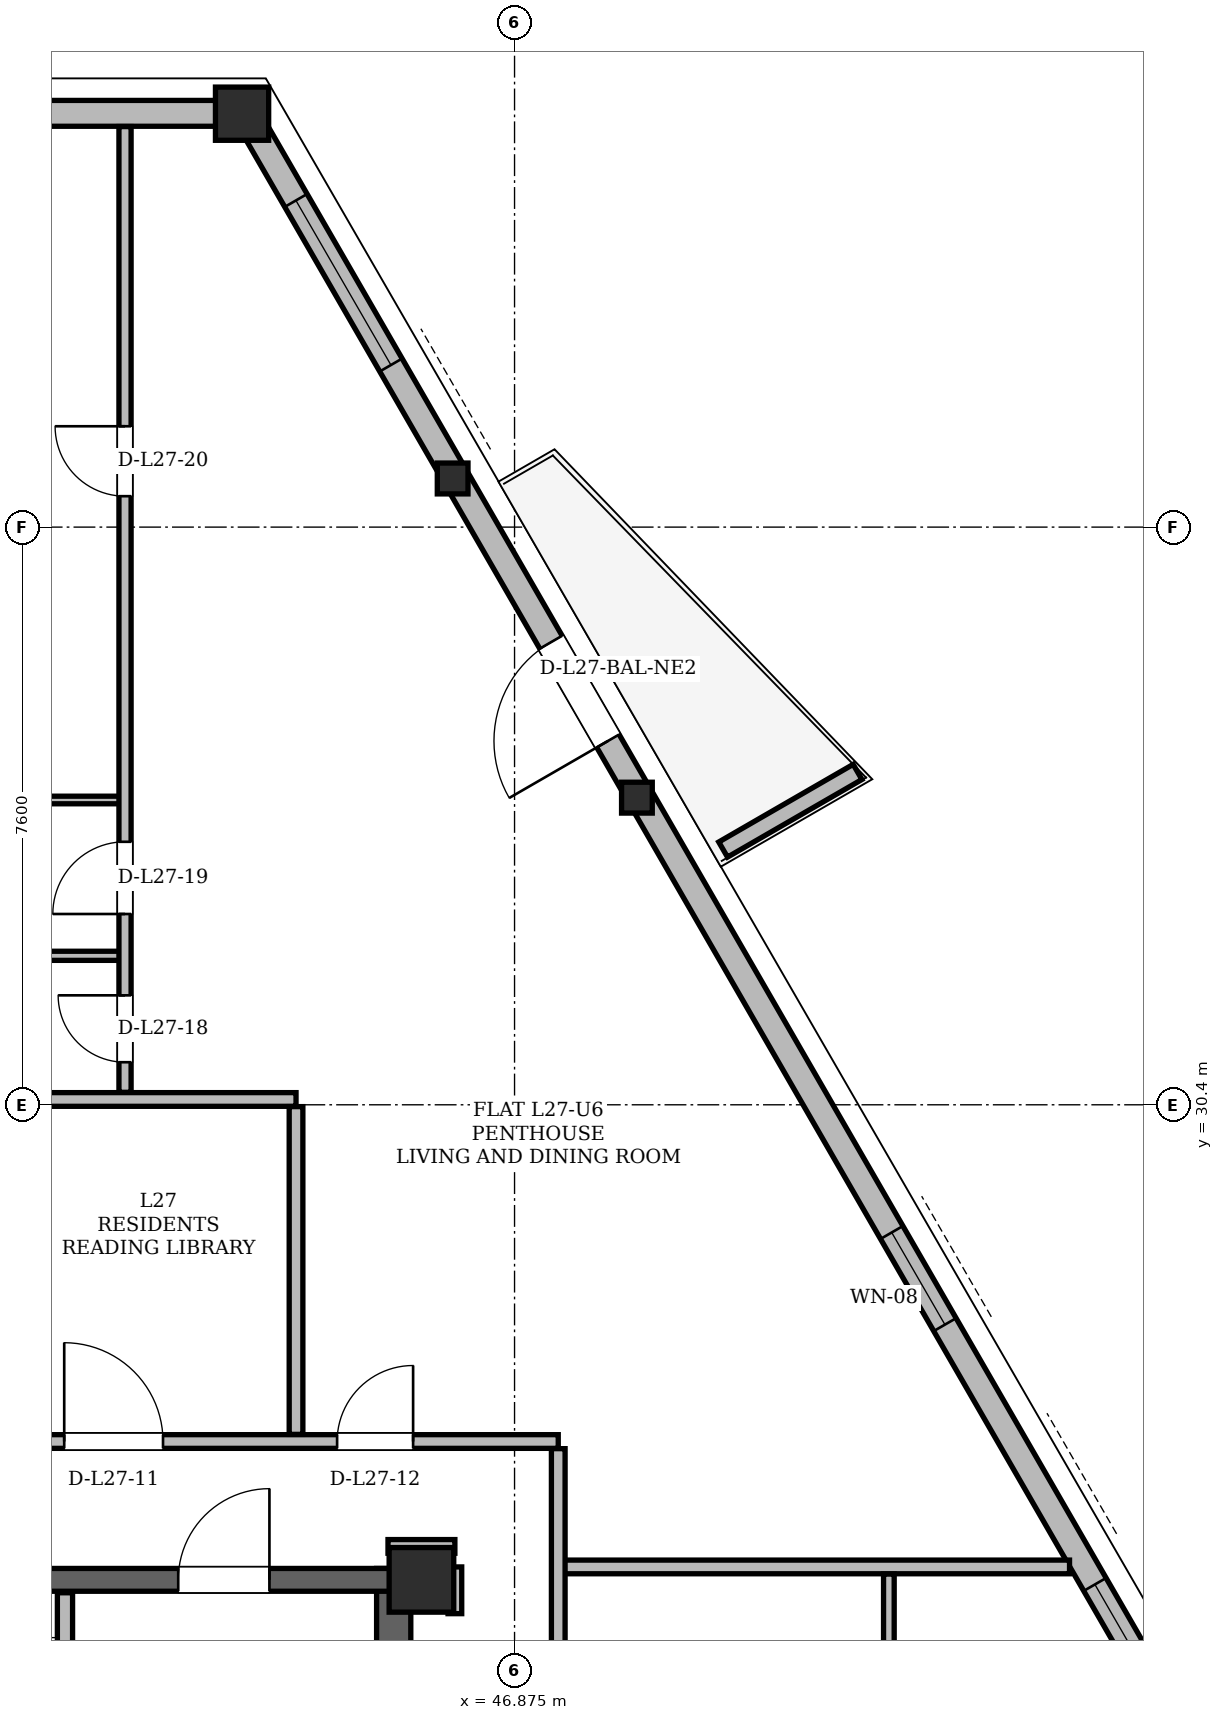
"""IFC4 building model, lengths in metres.
Left out: names, types, materials, properties, quantities, classifications, styles, units other than length and angle.
Written with IfcOpenShell. Run it as: python <this file> out.ifc"""

import sys

from ifc_helpers import new_model, si_unit, direction, frame, frame_2d, origin, origin_2d, place, context, subcontext, project, spatial, polyline, rectangle, hollow_rectangle, i_section, outline, extrude, element, fill, save


model = new_model("IFC4")
c1 = context("Model", 3, precision=1e-05, world=origin(), true_north=direction((0.0, 1.0)))
c2 = subcontext(c1, "Body", "Model", "MODEL_VIEW")
j1 = project(units=[si_unit("LENGTHUNIT", "METRE"), si_unit("PLANEANGLEUNIT", "RADIAN")], contexts=[c1])
p1 = place(None, origin())
s1 = spatial("IfcSite", under=j1, at=p1, CompositionType="ELEMENT")
p2 = place(p1, origin())
s2 = spatial("IfcBuilding", under=s1, at=p2, CompositionType="ELEMENT")
p3 = place(p2, frame((0.0, 0.0, 104.1)))
s3 = spatial("IfcBuildingStorey", under=s2, at=p3, CompositionType="ELEMENT", Elevation=104.1)
p4 = place(p3, frame((45.65, 24.15, 0.0), z_axis=(0.0, 0.0, 1.0), x_axis=(1.0, 0.0, 0.0)))
e1 = element("IfcColumn", 1, at=p4, inside=s3, PredefinedType="COLUMN", context=c2, shape_type="SweptSolid", body=[
    extrude(hollow_rectangle(XDim=0.85, YDim=0.85, WallThickness=0.07, at=origin_2d()), origin(), (0.0, 0.0, 1.0), 3.6),
])
p5 = place(p3, frame((43.337, 43.444, 0.004), z_axis=(-0.026165402281, -0.002582559186, 0.999654291299), x_axis=(0.098224011783, -0.995164329902, 0.0)))
e2 = element("IfcColumn", 2, at=p5, inside=s3, PredefinedType="COLUMN", context=c2, shape_type="SweptSolid", body=[
    extrude(hollow_rectangle(XDim=0.7, YDim=0.7, WallThickness=0.055, at=origin_2d()), origin(), (0.0, 0.0, 1.0), 3.592),
])
p6 = place(p3, frame((48.526, 34.455, 0.004), z_axis=(-0.022904357376, -0.008223819711, 0.999703835745), x_axis=(0.337928188485, -0.941171896854, 0.0)))
e3 = element("IfcColumn", 3, at=p6, inside=s3, PredefinedType="COLUMN", context=c2, shape_type="SweptSolid", body=[
    extrude(i_section(OverallWidth=0.404, OverallDepth=0.406, WebThickness=0.027, FlangeThickness=0.044, at=origin_2d()), origin(), (0.0, 0.0, 1.0), 3.592),
])
p7 = place(p3, frame((46.104, 38.65, 0.004), z_axis=(-0.024399180592, -0.00557307189, 0.999686761369), x_axis=(0.222677327733, -0.974892203125, 0.0)))
e4 = element("IfcColumn", 4, at=p7, inside=s3, PredefinedType="COLUMN", context=c2, shape_type="SweptSolid", body=[
    extrude(i_section(OverallWidth=0.404, OverallDepth=0.406, WebThickness=0.027, FlangeThickness=0.044, at=origin_2d()), origin(), (0.0, 0.0, 1.0), 3.592),
])
p8 = place(p3, frame((45.285, 11.0, 0.0), z_axis=(0.0, 0.0, 1.0), x_axis=(0.0, 1.0, 0.0)))
e5 = element("IfcWall", 5, at=p8, inside=s3, PredefinedType="SHEAR", context=c2, shape_type="SweptSolid", body=[
    extrude(rectangle(XDim=13.3, YDim=0.45, at=frame_2d((6.65, 0.0))), origin(), (0.0, 0.0, 1.0), 3.36),
])
p9 = place(p3, frame((29.65, 24.15, 0.0), z_axis=(0.0, 0.0, 1.0), x_axis=(1.0, 0.0, 0.0)))
e6 = element("IfcWall", 6, at=p9, inside=s3, PredefinedType="SHEAR", context=c2, shape_type="SweptSolid", body=[
    extrude(rectangle(XDim=15.7, YDim=0.3, at=frame_2d((7.85, 0.0))), origin(), (0.0, 0.0, 1.0), 3.36),
])
p10 = place(p9, frame((1.7, 0.0, 0.0)))
e7 = element("IfcOpeningElement", 7, at=p10, cuts=e6, PredefinedType="OPENING", context=c2, shape_type="SweptSolid", body=[
    extrude(rectangle(XDim=1.2, YDim=2.2, at=frame_2d((0.6, 1.1))), frame((0.0, 0.15, 0.0), z_axis=(0.0, -1.0, 0.0), x_axis=(1.0, 0.0, 0.0)), (0.0, 0.0, 1.0), 0.3),
])
p11 = place(p9, frame((12.8, 0.0, 0.0)))
e8 = element("IfcOpeningElement", 8, at=p11, cuts=e6, PredefinedType="OPENING", context=c2, shape_type="SweptSolid", body=[
    extrude(rectangle(XDim=1.2, YDim=2.2, at=frame_2d((0.6, 1.1))), frame((0.0, 0.15, 0.0), z_axis=(0.0, -1.0, 0.0), x_axis=(1.0, 0.0, 0.0)), (0.0, 0.0, 1.0), 0.3),
])
p12 = place(p9, frame((7.4, 0.0, 0.0)))
e9 = element("IfcOpeningElement", 9, at=p12, cuts=e6, PredefinedType="OPENING", context=c2, shape_type="SweptSolid", body=[
    extrude(rectangle(XDim=0.9, YDim=2.05, at=frame_2d((0.45, 1.025))), frame((0.0, 0.15, 0.0), z_axis=(0.0, -1.0, 0.0), x_axis=(1.0, 0.0, 0.0)), (0.0, 0.0, 1.0), 0.3),
])
p13 = place(p3, frame((60.635, 13.483, 0.0), z_axis=(0.0, 0.0, 1.0), x_axis=(-0.499998569178, 0.866026229868, 0.0)))
e10 = element("IfcWall", 10, at=p13, inside=s3, PredefinedType="SOLIDWALL", context=c2, shape_type="SweptSolid", body=[
    extrude(rectangle(XDim=34.595, YDim=0.34, at=frame_2d((17.298, 0.0))), origin(), (0.0, 0.0, 1.0), 2.578),
])
p14 = place(p13, frame((6.369, 0.0, 0.0)))
e11 = element("IfcOpeningElement", 11, at=p14, cuts=e10, PredefinedType="OPENING", context=c2, shape_type="SweptSolid", body=[
    extrude(rectangle(XDim=1.5, YDim=2.2, at=frame_2d((0.75, 1.1))), frame((0.0, 0.17, 0.0), z_axis=(0.0, -1.0, 0.0), x_axis=(1.0, 0.0, 0.0)), (0.0, 0.0, 1.0), 0.34),
])
p15 = place(p13, frame((25.061, 0.0, 0.0)))
e12 = element("IfcOpeningElement", 12, at=p15, cuts=e10, PredefinedType="OPENING", context=c2, shape_type="SweptSolid", body=[
    extrude(rectangle(XDim=1.5, YDim=2.2, at=frame_2d((0.75, 1.1))), frame((0.0, 0.17, 0.0), z_axis=(0.0, -1.0, 0.0), x_axis=(1.0, 0.0, 0.0)), (0.0, 0.0, 1.0), 0.34),
])
p16 = place(p13, frame((1.488, 0.0, 0.85)))
e13 = element("IfcOpeningElement", 13, at=p16, cuts=e10, PredefinedType="OPENING", context=c2, shape_type="SweptSolid", body=[
    extrude(rectangle(XDim=2.5, YDim=1.618, at=frame_2d((1.25, 0.809))), frame((0.0, 0.17, 0.0), z_axis=(0.0, -1.0, 0.0), x_axis=(1.0, 0.0, 0.0)), (0.0, 0.0, 1.0), 0.34),
])
p17 = place(p13, frame((11.047, 0.0, 0.85)))
e14 = element("IfcOpeningElement", 14, at=p17, cuts=e10, PredefinedType="OPENING", context=c2, shape_type="SweptSolid", body=[
    extrude(rectangle(XDim=1.2, YDim=1.48, at=frame_2d((0.6, 0.74))), frame((0.0, 0.17, 0.0), z_axis=(0.0, -1.0, 0.0), x_axis=(1.0, 0.0, 0.0)), (0.0, 0.0, 1.0), 0.34),
])
p18 = place(p13, frame((16.194, 0.0, 0.85)))
e15 = element("IfcOpeningElement", 15, at=p18, cuts=e10, PredefinedType="OPENING", context=c2, shape_type="SweptSolid", body=[
    extrude(rectangle(XDim=1.4, YDim=1.6, at=frame_2d((0.7, 0.8))), frame((0.0, 0.17, 0.0), z_axis=(0.0, -1.0, 0.0), x_axis=(1.0, 0.0, 0.0)), (0.0, 0.0, 1.0), 0.34),
])
p19 = place(p13, frame((30.772, 0.0, 0.85)))
e16 = element("IfcOpeningElement", 16, at=p19, cuts=e10, PredefinedType="OPENING", context=c2, shape_type="SweptSolid", body=[
    extrude(rectangle(XDim=2.5, YDim=1.618, at=frame_2d((1.25, 0.809))), frame((0.0, 0.17, 0.0), z_axis=(0.0, -1.0, 0.0), x_axis=(1.0, 0.0, 0.0)), (0.0, 0.0, 1.0), 0.34),
])
p20 = place(p3, frame((43.337, 43.444, 0.0), z_axis=(0.0, 0.0, 1.0), x_axis=(-1.0, 0.0, 0.0)))
e17 = element("IfcWall", 17, at=p20, inside=s3, PredefinedType="SOLIDWALL", context=c2, shape_type="SweptSolid", body=[
    extrude(rectangle(XDim=11.674, YDim=0.34, at=frame_2d((5.837, 0.0))), origin(), (0.0, 0.0, 1.0), 2.578),
])
p21 = place(p20, frame((3.158, 0.0, 0.85)))
e18 = element("IfcOpeningElement", 18, at=p21, cuts=e17, PredefinedType="OPENING", context=c2, shape_type="SweptSolid", body=[
    extrude(rectangle(XDim=1.2, YDim=1.48, at=frame_2d((0.6, 0.74))), frame((0.0, 0.17, 0.0), z_axis=(0.0, -1.0, 0.0), x_axis=(1.0, 0.0, 0.0)), (0.0, 0.0, 1.0), 0.34),
])
p22 = place(p3, frame((49.619, 33.758, 0.0), z_axis=(0.0, 0.0, 1.0), x_axis=(0.866042246008, 0.499970827278, 0.0)))
e19 = element("IfcWall", 19, at=p22, inside=s3, PredefinedType="PARAPET", context=c2, shape_type="SweptSolid", body=[
    extrude(outline(polyline([(0.0, 0.0), (2.042, 0.0), (2.042, 1.1), (0.0, 1.32), (0.0, 0.0)])), frame((0.0, 0.115, 0.0), z_axis=(0.0, -1.0, 0.0), x_axis=(1.0, 0.0, 0.0)), (0.0, 0.0, 1.0), 0.23),
])
p23 = place(p3, frame((40.96, 19.48, 0.0), z_axis=(0.0, 0.0, 1.0), x_axis=(0.0, 1.0, 0.0)))
e20 = element("IfcWall", 20, at=p23, inside=s3, PredefinedType="PARTITIONING", context=c2, shape_type="SweptSolid", body=[
    extrude(rectangle(XDim=4.5, YDim=0.2, at=frame_2d((2.25, 0.0))), origin(), (0.0, 0.0, 1.0), 2.4),
])
p24 = place(p23, frame((2.12, 0.0, 0.0)))
e21 = element("IfcOpeningElement", 21, at=p24, cuts=e20, PredefinedType="OPENING", context=c2, shape_type="SweptSolid", body=[
    extrude(rectangle(XDim=1.1, YDim=2.2, at=frame_2d((0.55, 1.1))), frame((0.0, 0.1, 0.0), z_axis=(0.0, -1.0, 0.0), x_axis=(1.0, 0.0, 0.0)), (0.0, 0.0, 1.0), 0.2),
])
p25 = place(p3, frame((47.45, 24.32, 0.0), z_axis=(0.0, 0.0, 1.0), x_axis=(1.0, 0.0, 0.0)))
e22 = element("IfcWall", 22, at=p25, inside=s3, PredefinedType="PARTITIONING", context=c2, shape_type="SweptSolid", body=[
    extrude(rectangle(XDim=6.727, YDim=0.18, at=frame_2d((3.364, 0.0))), origin(), (0.0, 0.0, 1.0), 3.36),
])
p26 = place(p3, frame((45.21, 24.59, 0.0), z_axis=(0.0, 0.0, 1.0), x_axis=(1.0, 0.0, 0.0)))
e23 = element("IfcWall", 23, at=p26, inside=s3, PredefinedType="PARTITIONING", context=c2, shape_type="SweptSolid", body=[
    extrude(rectangle(XDim=0.88, YDim=0.18, at=frame_2d((0.44, 0.0))), origin(), (0.0, 0.0, 1.0), 2.814),
])
p27 = place(p3, frame((27.55, 25.97, 0.0), z_axis=(0.0, 0.0, 1.0), x_axis=(1.0, 0.0, 0.0)))
e24 = element("IfcWall", 24, at=p27, inside=s3, PredefinedType="PARTITIONING", context=c2, shape_type="SweptSolid", body=[
    extrude(rectangle(XDim=19.9, YDim=0.18, at=frame_2d((9.95, 0.0))), origin(), (0.0, 0.0, 1.0), 2.814),
])
p28 = place(p27, frame((4.446, 0.0, 0.0)))
e25 = element("IfcOpeningElement", 25, at=p28, cuts=e24, PredefinedType="OPENING", context=c2, shape_type="SweptSolid", body=[
    extrude(rectangle(XDim=1.0, YDim=2.18, at=frame_2d((0.5, 1.09))), frame((0.0, 0.09, 0.0), z_axis=(0.0, -1.0, 0.0), x_axis=(1.0, 0.0, 0.0)), (0.0, 0.0, 1.0), 0.18),
])
p29 = place(p27, frame((13.4, 0.0, 0.0)))
e26 = element("IfcOpeningElement", 26, at=p29, cuts=e24, PredefinedType="OPENING", context=c2, shape_type="SweptSolid", body=[
    extrude(rectangle(XDim=1.3, YDim=2.2, at=frame_2d((0.65, 1.1))), frame((0.0, 0.09, 0.0), z_axis=(0.0, -1.0, 0.0), x_axis=(1.0, 0.0, 0.0)), (0.0, 0.0, 1.0), 0.18),
])
p30 = place(p27, frame((16.99, 0.0, 0.0)))
e27 = element("IfcOpeningElement", 27, at=p30, cuts=e24, PredefinedType="OPENING", context=c2, shape_type="SweptSolid", body=[
    extrude(rectangle(XDim=1.0, YDim=2.18, at=frame_2d((0.5, 1.09))), frame((0.0, 0.09, 0.0), z_axis=(0.0, -1.0, 0.0), x_axis=(1.0, 0.0, 0.0)), (0.0, 0.0, 1.0), 0.18),
])
p31 = place(p3, frame((39.2, 30.47, 0.0), z_axis=(0.0, 0.0, 1.0), x_axis=(1.0, 0.0, 0.0)))
e28 = element("IfcWall", 28, at=p31, inside=s3, PredefinedType="PARTITIONING", context=c2, shape_type="SweptSolid", body=[
    extrude(rectangle(XDim=4.8, YDim=0.18, at=frame_2d((2.4, 0.0))), origin(), (0.0, 0.0, 1.0), 3.36),
])
p32 = place(p3, frame((37.35, 32.36, 0.0), z_axis=(0.0, 0.0, 1.0), x_axis=(1.0, 0.0, 0.0)))
e29 = element("IfcWall", 29, at=p32, inside=s3, PredefinedType="PARTITIONING", context=c2, shape_type="SweptSolid", body=[
    extrude(rectangle(XDim=4.4, YDim=0.12, at=frame_2d((2.2, 0.0))), origin(), (0.0, 0.0, 1.0), 3.36),
])
p33 = place(p3, frame((37.35, 34.41, 0.0), z_axis=(0.0, 0.0, 1.0), x_axis=(1.0, 0.0, 0.0)))
e30 = element("IfcWall", 30, at=p33, inside=s3, PredefinedType="PARTITIONING", context=c2, shape_type="SweptSolid", body=[
    extrude(rectangle(XDim=4.4, YDim=0.1, at=frame_2d((2.2, 0.0))), origin(), (0.0, 0.0, 1.0), 3.36),
])
p34 = place(p3, frame((41.75, 30.564, 0.0), z_axis=(0.0, 0.0, 1.0), x_axis=(0.0, 1.0, 0.0)))
e31 = element("IfcWall", 31, at=p34, inside=s3, PredefinedType="PARTITIONING", context=c2, shape_type="SweptSolid", body=[
    extrude(rectangle(XDim=12.706, YDim=0.16, at=frame_2d((6.353, 0.0))), origin(), (0.0, 0.0, 1.0), 3.36),
])
p35 = place(p34, frame((0.396, 0.0, 0.0)))
e32 = element("IfcOpeningElement", 32, at=p35, cuts=e31, PredefinedType="OPENING", context=c2, shape_type="SweptSolid", body=[
    extrude(rectangle(XDim=0.88, YDim=2.08, at=frame_2d((0.44, 1.04))), frame((0.0, 0.08, 0.0), z_axis=(0.0, -1.0, 0.0), x_axis=(1.0, 0.0, 0.0)), (0.0, 0.0, 1.0), 0.16),
])
p36 = place(p34, frame((2.346, 0.0, 0.0)))
e33 = element("IfcOpeningElement", 33, at=p36, cuts=e31, PredefinedType="OPENING", context=c2, shape_type="SweptSolid", body=[
    extrude(rectangle(XDim=0.95, YDim=2.1, at=frame_2d((0.475, 1.05))), frame((0.0, 0.08, 0.0), z_axis=(0.0, -1.0, 0.0), x_axis=(1.0, 0.0, 0.0)), (0.0, 0.0, 1.0), 0.16),
])
p37 = place(p34, frame((7.843, 0.0, 0.0)))
e34 = element("IfcOpeningElement", 34, at=p37, cuts=e31, PredefinedType="OPENING", context=c2, shape_type="SweptSolid", body=[
    extrude(rectangle(XDim=0.92, YDim=2.12, at=frame_2d((0.46, 1.06))), frame((0.0, 0.08, 0.0), z_axis=(0.0, -1.0, 0.0), x_axis=(1.0, 0.0, 0.0)), (0.0, 0.0, 1.0), 0.16),
])
p38 = place(p3, frame((44.0, 26.064, 0.0), z_axis=(0.0, 0.0, 1.0), x_axis=(0.0, 1.0, 0.0)))
e35 = element("IfcWall", 35, at=p38, inside=s3, PredefinedType="PARTITIONING", context=c2, shape_type="SweptSolid", body=[
    extrude(rectangle(XDim=4.312, YDim=0.18, at=frame_2d((2.156, 0.0))), origin(), (0.0, 0.0, 1.0), 2.946),
])
p39 = place(p3, frame((46.09, 23.705, 0.0), z_axis=(0.0, 0.0, 1.0), x_axis=(0.0, 1.0, 0.0)))
e36 = element("IfcWall", 36, at=p39, inside=s3, PredefinedType="PARTITIONING", context=c2, shape_type="SweptSolid", body=[
    extrude(rectangle(XDim=0.615, YDim=0.18, at=frame_2d((0.308, 0.0))), origin(), (0.0, 0.0, 1.0), 2.946),
])
p40 = place(p3, frame((47.45, 11.044, 0.0), z_axis=(0.0, 0.0, 1.0), x_axis=(0.0, 1.0, 0.0)))
e37 = element("IfcWall", 37, at=p40, inside=s3, PredefinedType="PARTITIONING", context=c2, shape_type="SweptSolid", body=[
    extrude(rectangle(XDim=14.832, YDim=0.18, at=frame_2d((7.416, 0.0))), origin(), (0.0, 0.0, 1.0), 2.814),
])
p41 = place(p3, frame((51.8, 11.044, 0.0), z_axis=(0.0, 0.0, 1.0), x_axis=(0.0, 1.0, 0.0)))
e38 = element("IfcWall", 38, at=p41, inside=s3, PredefinedType="PARTITIONING", context=c2, shape_type="SweptSolid", body=[
    extrude(rectangle(XDim=13.182, YDim=0.14, at=frame_2d((6.591, 0.0))), origin(), (0.0, 0.0, 1.0), 2.814),
])
p42 = place(p41, frame((0.396, 0.0, 0.0)))
e39 = element("IfcOpeningElement", 39, at=p42, cuts=e38, PredefinedType="OPENING", context=c2, shape_type="SweptSolid", body=[
    extrude(rectangle(XDim=0.88, YDim=2.08, at=frame_2d((0.44, 1.04))), frame((0.0, 0.07, 0.0), z_axis=(0.0, -1.0, 0.0), x_axis=(1.0, 0.0, 0.0)), (0.0, 0.0, 1.0), 0.14),
])
p43 = place(p41, frame((2.346, 0.0, 0.0)))
e40 = element("IfcOpeningElement", 40, at=p43, cuts=e38, PredefinedType="OPENING", context=c2, shape_type="SweptSolid", body=[
    extrude(rectangle(XDim=0.95, YDim=2.1, at=frame_2d((0.475, 1.05))), frame((0.0, 0.07, 0.0), z_axis=(0.0, -1.0, 0.0), x_axis=(1.0, 0.0, 0.0)), (0.0, 0.0, 1.0), 0.14),
])
p44 = place(p41, frame((8.116, 0.0, 0.0)))
e41 = element("IfcOpeningElement", 41, at=p44, cuts=e38, PredefinedType="OPENING", context=c2, shape_type="SweptSolid", body=[
    extrude(rectangle(XDim=0.92, YDim=2.12, at=frame_2d((0.46, 1.06))), frame((0.0, 0.07, 0.0), z_axis=(0.0, -1.0, 0.0), x_axis=(1.0, 0.0, 0.0)), (0.0, 0.0, 1.0), 0.14),
])
p45 = place(p15, origin())
e42 = element("IfcDoor", 42, at=p45, inside=s3, OperationType="SINGLE_SWING_LEFT", PredefinedType="DOOR", context=c2, shape_type="SweptSolid", body=[
    extrude(rectangle(XDim=1.5, YDim=2.2, at=frame_2d((0.75, 1.1))), frame((0.0, 0.025, 0.0), z_axis=(0.0, -1.0, 0.0), x_axis=(1.0, 0.0, 0.0)), (0.0, 0.0, 1.0), 0.05),
])
fill(e12, e42)
p46 = place(p17, origin())
e43 = element("IfcWindow", 43, at=p46, inside=s3, PartitioningType="SINGLE_PANEL", PredefinedType="WINDOW", context=c2, shape_type="SweptSolid", body=[
    extrude(rectangle(XDim=1.2, YDim=1.48, at=frame_2d((0.6, 0.74))), frame((0.0, 0.03, 0.0), z_axis=(0.0, -1.0, 0.0), x_axis=(1.0, 0.0, 0.0)), (0.0, 0.0, 1.0), 0.06),
])
fill(e14, e43)
p47 = place(p18, origin())
e44 = element("IfcWindow", 44, at=p47, inside=s3, PartitioningType="SINGLE_PANEL", PredefinedType="WINDOW", context=c2, shape_type="SweptSolid", body=[
    extrude(rectangle(XDim=1.4, YDim=1.6, at=frame_2d((0.7, 0.8))), frame((0.0, 0.03, 0.0), z_axis=(0.0, -1.0, 0.0), x_axis=(1.0, 0.0, 0.0)), (0.0, 0.0, 1.0), 0.06),
])
fill(e15, e44)
p48 = place(p19, origin())
e45 = element("IfcWindow", 45, at=p48, inside=s3, PartitioningType="SINGLE_PANEL", PredefinedType="WINDOW", context=c2, shape_type="SweptSolid", body=[
    extrude(rectangle(XDim=2.5, YDim=1.618, at=frame_2d((1.25, 0.809))), frame((0.0, 0.03, 0.0), z_axis=(0.0, -1.0, 0.0), x_axis=(1.0, 0.0, 0.0)), (0.0, 0.0, 1.0), 0.06),
])
fill(e16, e45)
p49 = place(p11, origin())
e46 = element("IfcDoor", 46, at=p49, inside=s3, OperationType="SINGLE_SWING_RIGHT", PredefinedType="DOOR", context=c2, shape_type="SweptSolid", body=[
    extrude(rectangle(XDim=1.2, YDim=2.2, at=frame_2d((0.6, 1.1))), frame((0.0, 0.025, 0.0), z_axis=(0.0, -1.0, 0.0), x_axis=(1.0, 0.0, 0.0)), (0.0, 0.0, 1.0), 0.05),
])
fill(e8, e46)
p50 = place(p29, origin())
e47 = element("IfcDoor", 47, at=p50, inside=s3, OperationType="SINGLE_SWING_LEFT", PredefinedType="DOOR", context=c2, shape_type="SweptSolid", body=[
    extrude(rectangle(XDim=1.3, YDim=2.2, at=frame_2d((0.65, 1.1))), frame((0.0, 0.025, 0.0), z_axis=(0.0, -1.0, 0.0), x_axis=(1.0, 0.0, 0.0)), (0.0, 0.0, 1.0), 0.05),
])
fill(e26, e47)
p51 = place(p30, origin())
e48 = element("IfcDoor", 48, at=p51, inside=s3, OperationType="SINGLE_SWING_RIGHT", PredefinedType="DOOR", context=c2, shape_type="SweptSolid", body=[
    extrude(rectangle(XDim=1.0, YDim=2.18, at=frame_2d((0.5, 1.09))), frame((0.0, 0.025, 0.0), z_axis=(0.0, -1.0, 0.0), x_axis=(1.0, 0.0, 0.0)), (0.0, 0.0, 1.0), 0.05),
])
fill(e27, e48)
p52 = place(p35, origin())
e49 = element("IfcDoor", 49, at=p52, inside=s3, OperationType="SINGLE_SWING_RIGHT", PredefinedType="DOOR", context=c2, shape_type="SweptSolid", body=[
    extrude(rectangle(XDim=0.88, YDim=2.08, at=frame_2d((0.44, 1.04))), frame((0.0, 0.025, 0.0), z_axis=(0.0, -1.0, 0.0), x_axis=(1.0, 0.0, 0.0)), (0.0, 0.0, 1.0), 0.05),
])
fill(e32, e49)
p53 = place(p36, origin())
e50 = element("IfcDoor", 50, at=p53, inside=s3, OperationType="SINGLE_SWING_LEFT", PredefinedType="DOOR", context=c2, shape_type="SweptSolid", body=[
    extrude(rectangle(XDim=0.95, YDim=2.1, at=frame_2d((0.475, 1.05))), frame((0.0, 0.025, 0.0), z_axis=(0.0, -1.0, 0.0), x_axis=(1.0, 0.0, 0.0)), (0.0, 0.0, 1.0), 0.05),
])
fill(e33, e50)
p54 = place(p37, origin())
e51 = element("IfcDoor", 51, at=p54, inside=s3, OperationType="SINGLE_SWING_RIGHT", PredefinedType="DOOR", context=c2, shape_type="SweptSolid", body=[
    extrude(rectangle(XDim=0.92, YDim=2.12, at=frame_2d((0.46, 1.06))), frame((0.0, 0.025, 0.0), z_axis=(0.0, -1.0, 0.0), x_axis=(1.0, 0.0, 0.0)), (0.0, 0.0, 1.0), 0.05),
])
fill(e34, e51)
save(model, sys.argv[1])
